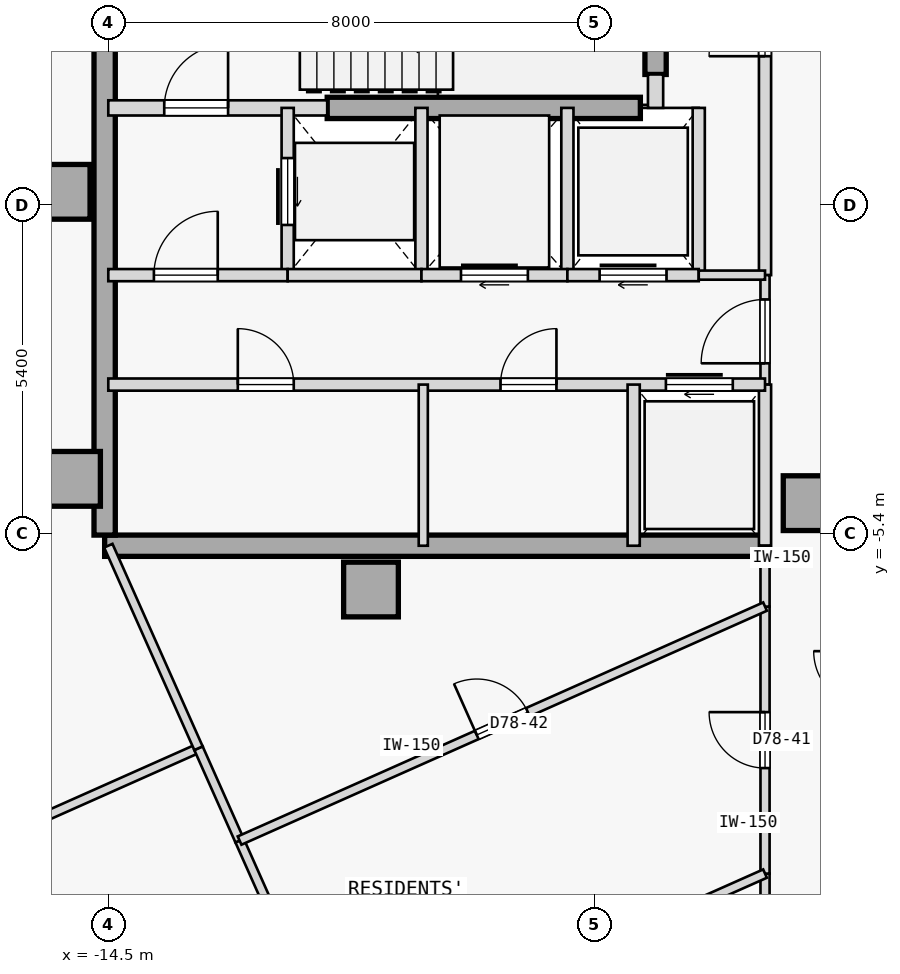
"""IFC4 building model, lengths in metres.
Left out: names, types, materials, properties, quantities, classifications, styles, units other than length and angle.
Written with IfcOpenShell. Run it as: python <this file> out.ifc"""

import sys

from ifc_helpers import new_model, si_unit, direction, frame, frame_2d, origin, origin_2d, place, context, subcontext, project, spatial, rectangle, extrude, element, fill, save


model = new_model("IFC4")
c1 = context("Model", 3, precision=1e-05, world=origin(), true_north=direction((0.0, 1.0)))
c2 = subcontext(c1, "Body", "Model", "MODEL_VIEW")
j1 = project(units=[si_unit("LENGTHUNIT", "METRE"), si_unit("PLANEANGLEUNIT", "RADIAN")], contexts=[c1])
p1 = place(None, origin())
s1 = spatial("IfcSite", under=j1, at=p1, CompositionType="ELEMENT")
p2 = place(p1, origin())
s2 = spatial("IfcBuilding", under=s1, at=p2, CompositionType="ELEMENT")
p3 = place(p2, frame((0.0, 0.0, 291.95)))
s3 = spatial("IfcBuildingStorey", under=s2, at=p3, CompositionType="ELEMENT", Elevation=291.95)
for number, where, z_axis, x_axis in (
    (1, (-15.25, 0.22, 0.0), (0.0, 0.0, 1.0), (1.0, 0.0, 0.0)),
    (2, (-15.08, -4.5, 0.0), (0.0, 0.0, 1.0), (1.0, 0.0, 0.0)),
    (3, (-10.18, -6.32, 0.0), (0.0, 0.0, 1.0), (1.0, 0.0, 0.0)),
    (4, (-2.95, -4.9, 0.0), (0.0, 0.0, 1.0), (1.0, 0.0, 0.0)),
):
    element("IfcColumn", number, at=place(p3, frame(where, z_axis=z_axis, x_axis=x_axis)), inside=s3, PredefinedType="COLUMN", context=c2, shape_type="SweptSolid", body=[
        extrude(rectangle(XDim=0.9, YDim=0.9, at=origin_2d()), origin(), (0.0, 0.0, 1.0), 3.35),
    ])
p4 = place(p3, frame((-14.56, -5.6, 0.0), z_axis=(0.0, 0.0, 1.0), x_axis=(1.0, 0.0, 0.0)))
e5 = element("IfcWall", 5, at=p4, inside=s3, PredefinedType="SHEAR", context=c2, shape_type="SweptSolid", body=[
    extrude(rectangle(XDim=10.86, YDim=0.35, at=frame_2d((5.43, 0.0))), origin(), (0.0, 0.0, 1.0), 3.125),
])
p5 = place(p3, frame((-14.56, -5.425, 0.0), z_axis=(0.0, 0.0, 1.0), x_axis=(0.0, 1.0, 0.0)))
e6 = element("IfcWall", 6, at=p5, inside=s3, PredefinedType="SHEAR", context=c2, shape_type="SweptSolid", body=[
    extrude(rectangle(XDim=10.85, YDim=0.35, at=frame_2d((5.425, 0.0))), origin(), (0.0, 0.0, 1.0), 3.125),
])
p6 = place(p3, frame((-5.5, 2.15, 0.0), z_axis=(0.0, 0.0, 1.0), x_axis=(0.0, 1.0, 0.0)))
e7 = element("IfcWall", 7, at=p6, inside=s3, PredefinedType="SHEAR", context=c2, shape_type="SweptSolid", body=[
    extrude(rectangle(XDim=3.275, YDim=0.35, at=frame_2d((1.638, 0.0))), origin(), (0.0, 0.0, 1.0), 3.125),
])
p7 = place(p3, frame((-10.9, 1.6, 0.0), z_axis=(0.0, 0.0, 1.0), x_axis=(1.0, 0.0, 0.0)))
e8 = element("IfcWall", 8, at=p7, inside=s3, PredefinedType="SHEAR", context=c2, shape_type="SweptSolid", body=[
    extrude(rectangle(XDim=5.15, YDim=0.35, at=frame_2d((2.575, 0.0))), origin(), (0.0, 0.0, 1.0), 3.125),
])
p8 = place(p3, frame((-14.5, 1.6, 0.0), z_axis=(0.0, 0.0, 1.0), x_axis=(1.0, 0.0, 0.0)))
e9 = element("IfcWall", 9, at=p8, inside=s3, PredefinedType="STANDARD", context=c2, shape_type="SweptSolid", body=[
    extrude(rectangle(XDim=3.6, YDim=0.25, at=frame_2d((1.8, 0.0))), origin(), (0.0, 0.0, 1.0), 3.125),
])
p9 = place(p8, frame((0.92, 0.0, 0.0)))
e10 = element("IfcOpeningElement", 10, at=p9, cuts=e9, PredefinedType="OPENING", context=c2, shape_type="SweptSolid", body=[
    extrude(rectangle(XDim=1.05, YDim=2.15, at=frame_2d((0.525, 1.075))), frame((0.0, 0.135, 0.0), z_axis=(0.0, -1.0, 0.0), x_axis=(1.0, 0.0, 0.0)), (0.0, 0.0, 1.0), 0.27),
])
p10 = place(p3, frame((-5.5, 1.6, 0.0), z_axis=(0.0, 0.0, 1.0), x_axis=(0.0, 1.0, 0.0)))
e11 = element("IfcWall", 11, at=p10, inside=s3, PredefinedType="STANDARD", context=c2, shape_type="SweptSolid", body=[
    extrude(rectangle(XDim=0.55, YDim=0.25, at=frame_2d((0.275, 0.0))), origin(), (0.0, 0.0, 1.0), 3.125),
])
p11 = place(p3, frame((-3.7, -1.15, 0.0), z_axis=(0.0, 0.0, 1.0), x_axis=(0.0, 1.0, 0.0)))
e12 = element("IfcWall", 12, at=p11, inside=s3, PredefinedType="STANDARD", context=c2, shape_type="SweptSolid", body=[
    extrude(rectangle(XDim=6.75, YDim=0.2, at=frame_2d((3.375, 0.0))), origin(), (0.0, 0.0, 1.0), 3.125),
])
p12 = place(p11, frame((3.6, 0.0, 0.0)))
e13 = element("IfcOpeningElement", 13, at=p12, cuts=e12, PredefinedType="OPENING", context=c2, shape_type="SweptSolid", body=[
    extrude(rectangle(XDim=0.92, YDim=2.15, at=frame_2d((0.46, 1.075))), frame((0.0, 0.11, 0.0), z_axis=(0.0, -1.0, 0.0), x_axis=(1.0, 0.0, 0.0)), (0.0, 0.0, 1.0), 0.22),
])
p13 = place(p3, frame((-3.7, -2.95, 0.0), z_axis=(0.0, 0.0, 1.0), x_axis=(0.0, 1.0, 0.0)))
e14 = element("IfcWall", 14, at=p13, inside=s3, PredefinedType="PARTITIONING", context=c2, shape_type="SweptSolid", body=[
    extrude(rectangle(XDim=1.8, YDim=0.15, at=frame_2d((0.9, 0.0))), origin(), (0.0, 0.0, 1.0), 3.125),
])
p14 = place(p13, frame((0.35, 0.0, 0.0)))
e15 = element("IfcOpeningElement", 15, at=p14, cuts=e14, PredefinedType="OPENING", context=c2, shape_type="SweptSolid", body=[
    extrude(rectangle(XDim=1.05, YDim=2.18, at=frame_2d((0.525, 1.09))), frame((0.0, 0.085, 0.0), z_axis=(0.0, -1.0, 0.0), x_axis=(1.0, 0.0, 0.0)), (0.0, 0.0, 1.0), 0.17),
])
p15 = place(p3, frame((-3.7, -5.6, 0.0), z_axis=(0.0, 0.0, 1.0), x_axis=(0.0, 1.0, 0.0)))
e16 = element("IfcWall", 16, at=p15, inside=s3, PredefinedType="STANDARD", context=c2, shape_type="SweptSolid", body=[
    extrude(rectangle(XDim=2.65, YDim=0.2, at=frame_2d((1.325, 0.0))), origin(), (0.0, 0.0, 1.0), 3.125),
])
p16 = place(p3, frame((-11.55, -1.15, 0.0), z_axis=(0.0, 0.0, 1.0), x_axis=(0.0, 1.0, 0.0)))
e17 = element("IfcWall", 17, at=p16, inside=s3, PredefinedType="STANDARD", context=c2, shape_type="SweptSolid", body=[
    extrude(rectangle(XDim=2.75, YDim=0.2, at=frame_2d((1.375, 0.0))), origin(), (0.0, 0.0, 1.0), 3.125),
])
p17 = place(p16, frame((0.825, 0.0, 0.0)))
e18 = element("IfcOpeningElement", 18, at=p17, cuts=e17, PredefinedType="OPENING", context=c2, shape_type="SweptSolid", body=[
    extrude(rectangle(XDim=1.1, YDim=2.15, at=frame_2d((0.55, 1.075))), frame((0.0, 0.11, 0.0), z_axis=(0.0, -1.0, 0.0), x_axis=(1.0, 0.0, 0.0)), (0.0, 0.0, 1.0), 0.22),
])
p18 = place(p3, frame((-9.35, -1.15, 0.0), z_axis=(0.0, 0.0, 1.0), x_axis=(0.0, 1.0, 0.0)))
e19 = element("IfcWall", 19, at=p18, inside=s3, PredefinedType="STANDARD", context=c2, shape_type="SweptSolid", body=[
    extrude(rectangle(XDim=2.75, YDim=0.2, at=frame_2d((1.375, 0.0))), origin(), (0.0, 0.0, 1.0), 3.125),
])
p19 = place(p3, frame((-14.5, -1.15, 0.0), z_axis=(0.0, 0.0, 1.0), x_axis=(1.0, 0.0, 0.0)))
e20 = element("IfcWall", 20, at=p19, inside=s3, PredefinedType="STANDARD", context=c2, shape_type="SweptSolid", body=[
    extrude(rectangle(XDim=2.95, YDim=0.2, at=frame_2d((1.475, 0.0))), origin(), (0.0, 0.0, 1.0), 3.125),
])
p20 = place(p19, frame((0.75, 0.0, 0.0)))
e21 = element("IfcOpeningElement", 21, at=p20, cuts=e20, PredefinedType="OPENING", context=c2, shape_type="SweptSolid", body=[
    extrude(rectangle(XDim=1.05, YDim=2.18, at=frame_2d((0.525, 1.09))), frame((0.0, 0.11, 0.0), z_axis=(0.0, -1.0, 0.0), x_axis=(1.0, 0.0, 0.0)), (0.0, 0.0, 1.0), 0.22),
])
p21 = place(p3, frame((-11.55, -1.15, 0.0), z_axis=(0.0, 0.0, 1.0), x_axis=(1.0, 0.0, 0.0)))
e22 = element("IfcWall", 22, at=p21, inside=s3, PredefinedType="STANDARD", context=c2, shape_type="SweptSolid", body=[
    extrude(rectangle(XDim=2.2, YDim=0.2, at=frame_2d((1.1, 0.0))), origin(), (0.0, 0.0, 1.0), 3.125),
])
p22 = place(p3, frame((-6.95, -1.15, 0.0), z_axis=(0.0, 0.0, 1.0), x_axis=(0.0, 1.0, 0.0)))
e23 = element("IfcWall", 23, at=p22, inside=s3, PredefinedType="STANDARD", context=c2, shape_type="SweptSolid", body=[
    extrude(rectangle(XDim=2.75, YDim=0.2, at=frame_2d((1.375, 0.0))), origin(), (0.0, 0.0, 1.0), 3.125),
])
p23 = place(p3, frame((-9.35, -1.15, 0.0), z_axis=(0.0, 0.0, 1.0), x_axis=(1.0, 0.0, 0.0)))
e24 = element("IfcWall", 24, at=p23, inside=s3, PredefinedType="STANDARD", context=c2, shape_type="SweptSolid", body=[
    extrude(rectangle(XDim=2.4, YDim=0.2, at=frame_2d((1.2, 0.0))), origin(), (0.0, 0.0, 1.0), 3.125),
])
p24 = place(p23, frame((0.65, 0.0, 0.0)))
e25 = element("IfcOpeningElement", 25, at=p24, cuts=e24, PredefinedType="OPENING", context=c2, shape_type="SweptSolid", body=[
    extrude(rectangle(XDim=1.1, YDim=2.15, at=frame_2d((0.55, 1.075))), frame((0.0, 0.11, 0.0), z_axis=(0.0, -1.0, 0.0), x_axis=(1.0, 0.0, 0.0)), (0.0, 0.0, 1.0), 0.22),
])
p25 = place(p3, frame((-4.79, -1.15, 0.0), z_axis=(0.0, 0.0, 1.0), x_axis=(0.0, 1.0, 0.0)))
e26 = element("IfcWall", 26, at=p25, inside=s3, PredefinedType="STANDARD", context=c2, shape_type="SweptSolid", body=[
    extrude(rectangle(XDim=2.75, YDim=0.2, at=frame_2d((1.375, 0.0))), origin(), (0.0, 0.0, 1.0), 3.125),
])
p26 = place(p3, frame((-6.95, -1.15, 0.0), z_axis=(0.0, 0.0, 1.0), x_axis=(1.0, 0.0, 0.0)))
e27 = element("IfcWall", 27, at=p26, inside=s3, PredefinedType="STANDARD", context=c2, shape_type="SweptSolid", body=[
    extrude(rectangle(XDim=2.16, YDim=0.2, at=frame_2d((1.08, 0.0))), origin(), (0.0, 0.0, 1.0), 3.125),
])
p27 = place(p26, frame((0.53, 0.0, 0.0)))
e28 = element("IfcOpeningElement", 28, at=p27, cuts=e27, PredefinedType="OPENING", context=c2, shape_type="SweptSolid", body=[
    extrude(rectangle(XDim=1.1, YDim=2.15, at=frame_2d((0.55, 1.075))), frame((0.0, 0.11, 0.0), z_axis=(0.0, -1.0, 0.0), x_axis=(1.0, 0.0, 0.0)), (0.0, 0.0, 1.0), 0.22),
])
p28 = place(p3, frame((-4.79, -1.15, 0.0), z_axis=(0.0, 0.0, 1.0), x_axis=(1.0, 0.0, 0.0)))
e29 = element("IfcWall", 29, at=p28, inside=s3, PredefinedType="PARTITIONING", context=c2, shape_type="SweptSolid", body=[
    extrude(rectangle(XDim=1.09, YDim=0.15, at=frame_2d((0.545, 0.0))), origin(), (0.0, 0.0, 1.0), 3.125),
])
p29 = place(p3, frame((-14.5, -2.95, 0.0), z_axis=(0.0, 0.0, 1.0), x_axis=(1.0, 0.0, 0.0)))
e30 = element("IfcWall", 30, at=p29, inside=s3, PredefinedType="STANDARD", context=c2, shape_type="SweptSolid", body=[
    extrude(rectangle(XDim=10.8, YDim=0.2, at=frame_2d((5.4, 0.0))), origin(), (0.0, 0.0, 1.0), 3.125),
])
p30 = place(p29, frame((9.17, 0.0, 0.0)))
e31 = element("IfcOpeningElement", 31, at=p30, cuts=e30, PredefinedType="OPENING", context=c2, shape_type="SweptSolid", body=[
    extrude(rectangle(XDim=1.1, YDim=2.15, at=frame_2d((0.55, 1.075))), frame((0.0, 0.11, 0.0), z_axis=(0.0, -1.0, 0.0), x_axis=(1.0, 0.0, 0.0)), (0.0, 0.0, 1.0), 0.22),
])
p31 = place(p29, frame((2.13, 0.0, 0.0)))
e32 = element("IfcOpeningElement", 32, at=p31, cuts=e30, PredefinedType="OPENING", context=c2, shape_type="SweptSolid", body=[
    extrude(rectangle(XDim=0.92, YDim=2.15, at=frame_2d((0.46, 1.075))), frame((0.0, 0.11, 0.0), z_axis=(0.0, -1.0, 0.0), x_axis=(1.0, 0.0, 0.0)), (0.0, 0.0, 1.0), 0.22),
])
p32 = place(p29, frame((6.45, 0.0, 0.0)))
e33 = element("IfcOpeningElement", 33, at=p32, cuts=e30, PredefinedType="OPENING", context=c2, shape_type="SweptSolid", body=[
    extrude(rectangle(XDim=0.92, YDim=2.15, at=frame_2d((0.46, 1.075))), frame((0.0, 0.11, 0.0), z_axis=(0.0, -1.0, 0.0), x_axis=(1.0, 0.0, 0.0)), (0.0, 0.0, 1.0), 0.22),
])
p33 = place(p3, frame((-5.86, -5.6, 0.0), z_axis=(0.0, 0.0, 1.0), x_axis=(0.0, 1.0, 0.0)))
e34 = element("IfcWall", 34, at=p33, inside=s3, PredefinedType="STANDARD", context=c2, shape_type="SweptSolid", body=[
    extrude(rectangle(XDim=2.65, YDim=0.2, at=frame_2d((1.325, 0.0))), origin(), (0.0, 0.0, 1.0), 3.125),
])
p34 = place(p3, frame((-9.32, -5.6, 0.0), z_axis=(0.0, 0.0, 1.0), x_axis=(0.0, 1.0, 0.0)))
e35 = element("IfcWall", 35, at=p34, inside=s3, PredefinedType="PARTITIONING", context=c2, shape_type="SweptSolid", body=[
    extrude(rectangle(XDim=2.65, YDim=0.15, at=frame_2d((1.325, 0.0))), origin(), (0.0, 0.0, 1.0), 3.125),
])
p35 = place(p3, frame((-4.445, -15.808, 0.0), z_axis=(0.0, 0.0, 1.0), x_axis=(0.913546853922, 0.406733506966, 0.0)))
e36 = element("IfcWall", 36, at=p35, inside=s3, PredefinedType="PARTITIONING", context=c2, shape_type="SweptSolid", body=[
    extrude(rectangle(XDim=12.751, YDim=0.15, at=frame_2d((6.375, 0.0))), origin(), (0.0, 0.0, 1.0), 3.125),
])
p36 = place(p35, frame((5.9, 0.0, 0.0)))
e37 = element("IfcOpeningElement", 37, at=p36, cuts=e36, PredefinedType="OPENING", context=c2, shape_type="SweptSolid", body=[
    extrude(rectangle(XDim=0.95, YDim=2.15, at=frame_2d((0.475, 1.075))), frame((0.0, 0.085, 0.0), z_axis=(0.0, -1.0, 0.0), x_axis=(1.0, 0.0, 0.0)), (0.0, 0.0, 1.0), 0.17),
])
p37 = place(p3, frame((-3.7, -13.703, 0.0), z_axis=(0.0, 0.0, 1.0), x_axis=(9.0033312e-05, 0.999999995947, 0.0)))
e38 = element("IfcWall", 38, at=p37, inside=s3, PredefinedType="PARTITIONING", context=c2, shape_type="SweptSolid", body=[
    extrude(rectangle(XDim=2.712, YDim=0.15, at=frame_2d((1.356, 0.0))), origin(), (0.0, 0.0, 1.0), 3.125),
])
p38 = place(p3, frame((-3.7, -10.992, 0.0), z_axis=(0.0, 0.0, 1.0), x_axis=(0.0, 1.0, 0.0)))
e39 = element("IfcWall", 39, at=p38, inside=s3, PredefinedType="PARTITIONING", context=c2, shape_type="SweptSolid", body=[
    extrude(rectangle(XDim=4.391, YDim=0.15, at=frame_2d((2.195, 0.0))), origin(), (0.0, 0.0, 1.0), 3.125),
])
p39 = place(p38, frame((1.735, 0.0, 0.0)))
e40 = element("IfcOpeningElement", 40, at=p39, cuts=e39, PredefinedType="OPENING", context=c2, shape_type="SweptSolid", body=[
    extrude(rectangle(XDim=0.92, YDim=2.15, at=frame_2d((0.46, 1.075))), frame((0.0, 0.085, 0.0), z_axis=(0.0, -1.0, 0.0), x_axis=(1.0, 0.0, 0.0)), (0.0, 0.0, 1.0), 0.17),
])
p40 = place(p3, frame((-3.7, -6.601, 0.0), z_axis=(0.0, 0.0, 1.0), x_axis=(-0.000243783513, 0.999999970285, 0.0)))
e41 = element("IfcWall", 41, at=p40, inside=s3, PredefinedType="PARTITIONING", context=c2, shape_type="SweptSolid", body=[
    extrude(rectangle(XDim=1.001, YDim=0.15, at=frame_2d((0.501, 0.0))), origin(), (0.0, 0.0, 1.0), 3.125),
])
p41 = place(p3, frame((-23.76, -13.713, 0.0), z_axis=(0.0, 0.0, 1.0), x_axis=(0.913544247064, 0.406739362069, 0.0)))
e42 = element("IfcWall", 42, at=p41, inside=s3, PredefinedType="PARTITIONING", context=c2, shape_type="SweptSolid", body=[
    extrude(rectangle(XDim=11.76, YDim=0.15, at=frame_2d((5.88, 0.0))), origin(), (0.0, 0.0, 1.0), 3.125),
])
p42 = place(p41, frame((5.42, 0.0, 0.0)))
e43 = element("IfcOpeningElement", 43, at=p42, cuts=e42, PredefinedType="OPENING", context=c2, shape_type="SweptSolid", body=[
    extrude(rectangle(XDim=0.92, YDim=2.15, at=frame_2d((0.46, 1.075))), frame((0.0, 0.085, 0.0), z_axis=(0.0, -1.0, 0.0), x_axis=(1.0, 0.0, 0.0)), (0.0, 0.0, 1.0), 0.17),
])
p43 = place(p3, frame((-11.046, -13.357, 0.0), z_axis=(0.0, 0.0, 1.0), x_axis=(-0.406707553978, 0.913558408388, 0.0)))
e44 = element("IfcWall", 44, at=p43, inside=s3, PredefinedType="PARTITIONING", context=c2, shape_type="SweptSolid", body=[
    extrude(rectangle(XDim=3.184, YDim=0.15, at=frame_2d((1.592, 0.0))), origin(), (0.0, 0.0, 1.0), 3.125),
])
p44 = place(p3, frame((-12.341, -10.448, 0.0), z_axis=(0.0, 0.0, 1.0), x_axis=(-0.406751698222, 0.913538754511, 0.0)))
e45 = element("IfcWall", 45, at=p44, inside=s3, PredefinedType="PARTITIONING", context=c2, shape_type="SweptSolid", body=[
    extrude(rectangle(XDim=1.662, YDim=0.15, at=frame_2d((0.831, 0.0))), origin(), (0.0, 0.0, 1.0), 3.125),
])
p45 = place(p3, frame((-13.017, -8.93, 0.0), z_axis=(0.0, 0.0, 1.0), x_axis=(-0.406722395322, 0.913551801018, 0.0)))
e46 = element("IfcWall", 46, at=p45, inside=s3, PredefinedType="PARTITIONING", context=c2, shape_type="SweptSolid", body=[
    extrude(rectangle(XDim=3.646, YDim=0.15, at=frame_2d((1.823, 0.0))), origin(), (0.0, 0.0, 1.0), 3.125),
])
p46 = place(p3, frame((-10.709, -14.113, 0.0), z_axis=(0.0, 0.0, 1.0), x_axis=(0.91353843513, 0.40675241553, 0.0)))
e47 = element("IfcWall", 47, at=p46, inside=s3, PredefinedType="PARTITIONING", context=c2, shape_type="SweptSolid", body=[
    extrude(rectangle(XDim=7.673, YDim=0.15, at=frame_2d((3.836, 0.0))), origin(), (0.0, 0.0, 1.0), 3.125),
])
p47 = place(p3, frame((-12.341, -10.448, 0.0), z_axis=(0.0, 0.0, 1.0), x_axis=(0.913539934271, 0.406749048544, 0.0)))
e48 = element("IfcWall", 48, at=p47, inside=s3, PredefinedType="PARTITIONING", context=c2, shape_type="SweptSolid", body=[
    extrude(rectangle(XDim=9.459, YDim=0.15, at=frame_2d((4.729, 0.0))), origin(), (0.0, 0.0, 1.0), 3.125),
])
p48 = place(p47, frame((4.27, 0.0, 0.0)))
e49 = element("IfcOpeningElement", 49, at=p48, cuts=e48, PredefinedType="OPENING", context=c2, shape_type="SweptSolid", body=[
    extrude(rectangle(XDim=0.92, YDim=2.15, at=frame_2d((0.46, 1.075))), frame((0.0, 0.085, 0.0), z_axis=(0.0, -1.0, 0.0), x_axis=(1.0, 0.0, 0.0)), (0.0, 0.0, 1.0), 0.17),
])
p49 = place(p9, origin())
e50 = element("IfcDoor", 50, at=p49, inside=s3, OperationType="SINGLE_SWING_RIGHT", PredefinedType="DOOR", context=c2, shape_type="SweptSolid", body=[
    extrude(rectangle(XDim=1.05, YDim=2.15, at=frame_2d((0.525, 1.075))), frame((0.0, 0.025, 0.0), z_axis=(0.0, -1.0, 0.0), x_axis=(1.0, 0.0, 0.0)), (0.0, 0.0, 1.0), 0.05),
])
fill(e10, e50)
p50 = place(p20, origin())
e51 = element("IfcDoor", 51, at=p50, inside=s3, OperationType="SINGLE_SWING_RIGHT", PredefinedType="DOOR", context=c2, shape_type="SweptSolid", body=[
    extrude(rectangle(XDim=1.05, YDim=2.18, at=frame_2d((0.525, 1.09))), frame((0.0, 0.025, 0.0), z_axis=(0.0, -1.0, 0.0), x_axis=(1.0, 0.0, 0.0)), (0.0, 0.0, 1.0), 0.05),
])
fill(e21, e51)
p51 = place(p14, origin())
e52 = element("IfcDoor", 52, at=p51, inside=s3, OperationType="SINGLE_SWING_LEFT", PredefinedType="DOOR", context=c2, shape_type="SweptSolid", body=[
    extrude(rectangle(XDim=1.05, YDim=2.18, at=frame_2d((0.525, 1.09))), frame((0.0, 0.025, 0.0), z_axis=(0.0, -1.0, 0.0), x_axis=(1.0, 0.0, 0.0)), (0.0, 0.0, 1.0), 0.05),
])
fill(e15, e52)
p52 = place(p17, origin())
e53 = element("IfcDoor", 53, at=p52, inside=s3, OperationType="SLIDING_TO_RIGHT", PredefinedType="DOOR", context=c2, shape_type="SweptSolid", body=[
    extrude(rectangle(XDim=1.1, YDim=2.15, at=frame_2d((0.55, 1.075))), frame((0.0, 0.025, 0.0), z_axis=(0.0, -1.0, 0.0), x_axis=(1.0, 0.0, 0.0)), (0.0, 0.0, 1.0), 0.05),
])
fill(e18, e53)
p53 = place(p24, origin())
e54 = element("IfcDoor", 54, at=p53, inside=s3, OperationType="SLIDING_TO_RIGHT", PredefinedType="DOOR", context=c2, shape_type="SweptSolid", body=[
    extrude(rectangle(XDim=1.1, YDim=2.15, at=frame_2d((0.55, 1.075))), frame((0.0, 0.025, 0.0), z_axis=(0.0, -1.0, 0.0), x_axis=(1.0, 0.0, 0.0)), (0.0, 0.0, 1.0), 0.05),
])
fill(e25, e54)
p54 = place(p27, origin())
e55 = element("IfcDoor", 55, at=p54, inside=s3, OperationType="SLIDING_TO_RIGHT", PredefinedType="DOOR", context=c2, shape_type="SweptSolid", body=[
    extrude(rectangle(XDim=1.1, YDim=2.15, at=frame_2d((0.55, 1.075))), frame((0.0, 0.025, 0.0), z_axis=(0.0, -1.0, 0.0), x_axis=(1.0, 0.0, 0.0)), (0.0, 0.0, 1.0), 0.05),
])
fill(e28, e55)
p55 = place(p30, origin())
e56 = element("IfcDoor", 56, at=p55, inside=s3, OperationType="SLIDING_TO_RIGHT", PredefinedType="DOOR", context=c2, shape_type="SweptSolid", body=[
    extrude(rectangle(XDim=1.1, YDim=2.15, at=frame_2d((0.55, 1.075))), frame((0.0, 0.025, 0.0), z_axis=(0.0, -1.0, 0.0), x_axis=(1.0, 0.0, 0.0)), (0.0, 0.0, 1.0), 0.05),
])
fill(e31, e56)
p56 = place(p31, origin())
e57 = element("IfcDoor", 57, at=p56, inside=s3, OperationType="SINGLE_SWING_LEFT", PredefinedType="DOOR", context=c2, shape_type="SweptSolid", body=[
    extrude(rectangle(XDim=0.92, YDim=2.15, at=frame_2d((0.46, 1.075))), frame((0.0, 0.025, 0.0), z_axis=(0.0, -1.0, 0.0), x_axis=(1.0, 0.0, 0.0)), (0.0, 0.0, 1.0), 0.05),
])
fill(e32, e57)
p57 = place(p32, origin())
e58 = element("IfcDoor", 58, at=p57, inside=s3, OperationType="SINGLE_SWING_RIGHT", PredefinedType="DOOR", context=c2, shape_type="SweptSolid", body=[
    extrude(rectangle(XDim=0.92, YDim=2.15, at=frame_2d((0.46, 1.075))), frame((0.0, 0.025, 0.0), z_axis=(0.0, -1.0, 0.0), x_axis=(1.0, 0.0, 0.0)), (0.0, 0.0, 1.0), 0.05),
])
fill(e33, e58)
p58 = place(p12, origin())
e59 = element("IfcDoor", 59, at=p58, inside=s3, OperationType="SINGLE_SWING_LEFT", PredefinedType="DOOR", context=c2, shape_type="SweptSolid", body=[
    extrude(rectangle(XDim=0.92, YDim=2.15, at=frame_2d((0.46, 1.075))), frame((0.0, 0.025, 0.0), z_axis=(0.0, -1.0, 0.0), x_axis=(1.0, 0.0, 0.0)), (0.0, 0.0, 1.0), 0.05),
])
fill(e13, e59)
p59 = place(p39, origin())
e60 = element("IfcDoor", 60, at=p59, inside=s3, OperationType="SINGLE_SWING_RIGHT", PredefinedType="DOOR", context=c2, shape_type="SweptSolid", body=[
    extrude(rectangle(XDim=0.92, YDim=2.15, at=frame_2d((0.46, 1.075))), frame((0.0, 0.025, 0.0), z_axis=(0.0, -1.0, 0.0), x_axis=(1.0, 0.0, 0.0)), (0.0, 0.0, 1.0), 0.05),
])
fill(e40, e60)
p60 = place(p48, origin())
e61 = element("IfcDoor", 61, at=p60, inside=s3, OperationType="SINGLE_SWING_LEFT", PredefinedType="DOOR", context=c2, shape_type="SweptSolid", body=[
    extrude(rectangle(XDim=0.92, YDim=2.15, at=frame_2d((0.46, 1.075))), frame((0.0, 0.025, 0.0), z_axis=(0.0, -1.0, 0.0), x_axis=(1.0, 0.0, 0.0)), (0.0, 0.0, 1.0), 0.05),
])
fill(e49, e61)
save(model, sys.argv[1])
